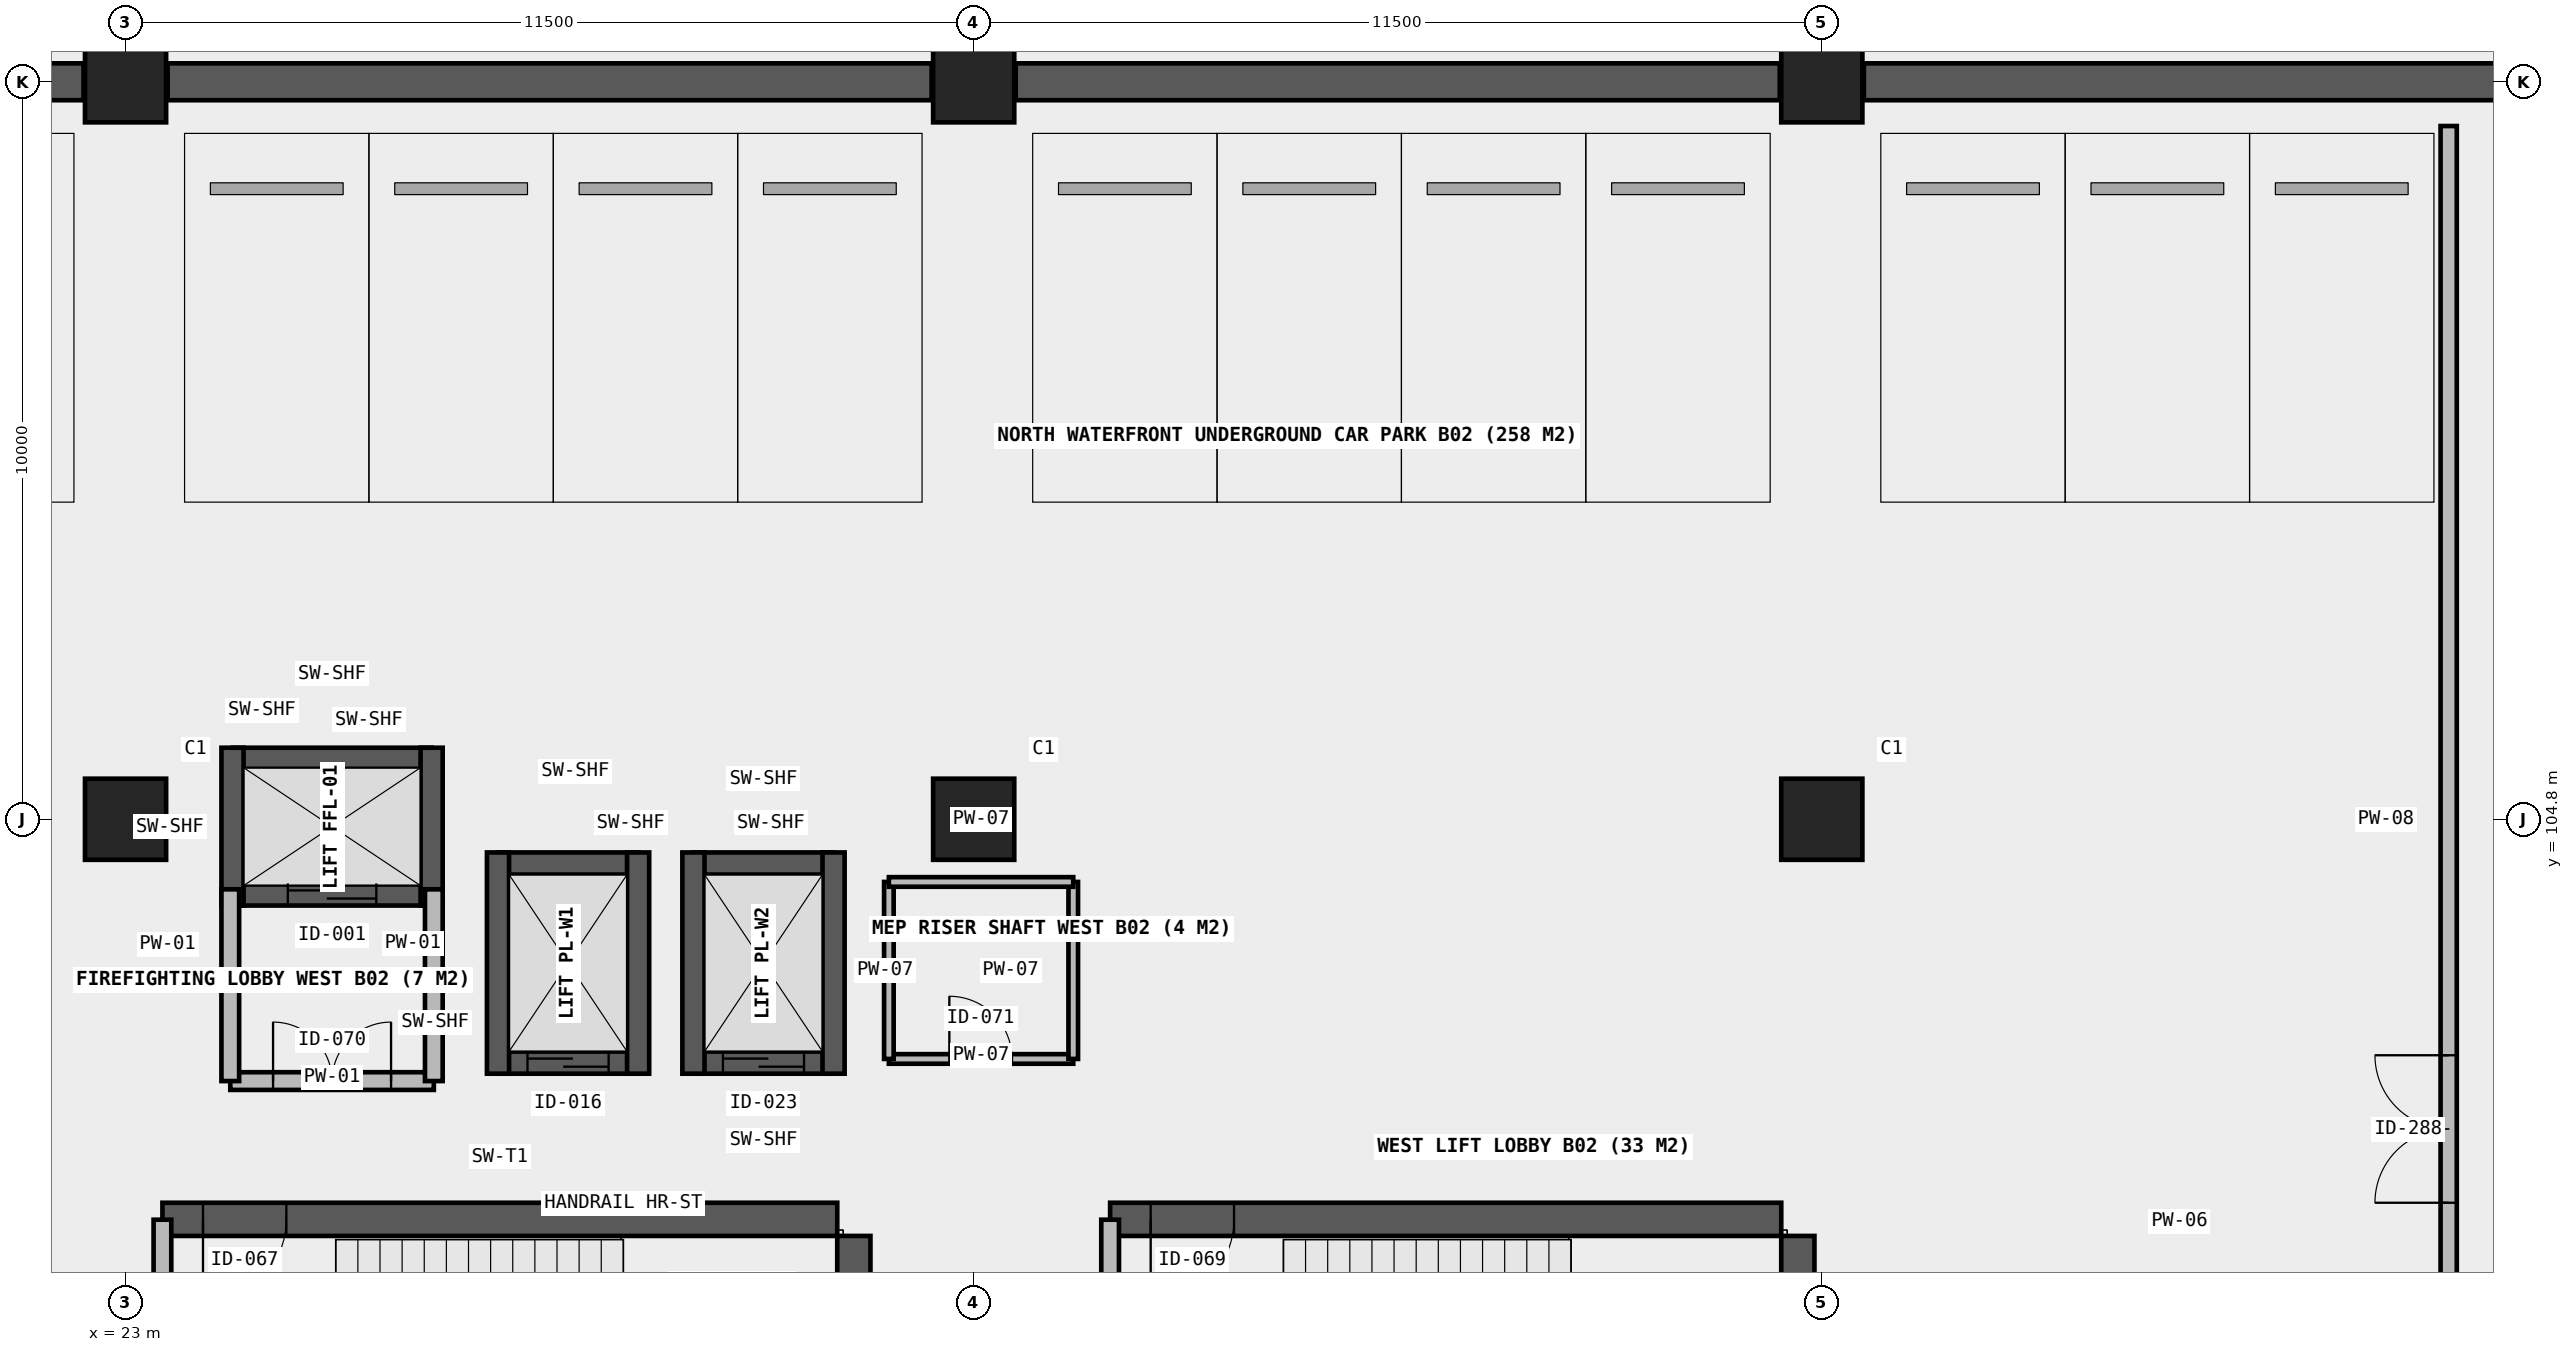
"""IFC4 building model, lengths in metres.
Left out: names, types, materials, properties, quantities, classifications, styles, units other than length and angle.
Written with IfcOpenShell. Run it as: python <this file> out.ifc"""

import sys

from ifc_helpers import new_model, si_unit, direction, frame, frame_2d, origin, origin_2d, place, context, subcontext, project, spatial, rectangle, extrude, element, fill, save


model = new_model("IFC4")
c1 = context("Model", 3, precision=1e-05, world=origin(), true_north=direction((0.0, 1.0)))
c2 = subcontext(c1, "Body", "Model", "MODEL_VIEW")
j1 = project(units=[si_unit("LENGTHUNIT", "METRE"), si_unit("PLANEANGLEUNIT", "RADIAN")], contexts=[c1])
p1 = place(None, origin())
s1 = spatial("IfcSite", under=j1, at=p1, CompositionType="ELEMENT")
p2 = place(p1, origin())
s2 = spatial("IfcBuilding", under=s1, at=p2, CompositionType="ELEMENT")
p3 = place(p2, frame((0.0, 0.0, -8.4)))
s3 = spatial("IfcBuildingStorey", under=s2, at=p3, CompositionType="ELEMENT", Elevation=-8.4)
for number, where, z_axis, x_axis in (
    (1, (23.0, 104.8, 0.0), (0.0, 0.0, 1.0), (1.0, 0.0, 0.0)),
    (2, (23.0, 114.8, 0.0), (0.0, 0.0, 1.0), (1.0, 0.0, 0.0)),
    (3, (34.5, 104.8, 0.0), (0.0, 0.0, 1.0), (1.0, 0.0, 0.0)),
    (4, (34.5, 114.8, 0.0), (0.0, 0.0, 1.0), (1.0, 0.0, 0.0)),
    (5, (46.0, 104.8, 0.0), (0.0, 0.0, 1.0), (1.0, 0.0, 0.0)),
    (6, (46.0, 114.8, 0.0), (0.0, 0.0, 1.0), (1.0, 0.0, 0.0)),
):
    element("IfcColumn", number, at=place(p3, frame(where, z_axis=z_axis, x_axis=x_axis)), inside=s3, PredefinedType="COLUMN", context=c2, shape_type="SweptSolid", body=[
        extrude(rectangle(XDim=1.1, YDim=1.1, at=origin_2d()), origin(), (0.0, 0.0, 1.0), 4.2),
    ])
for number, where, z_axis, x_axis in (
    (7, (12.07, 114.8, 0.0), (0.0, 0.0, 1.0), (1.0, 0.0, 0.0)),
    (8, (23.57, 114.8, 0.0), (0.0, 0.0, 1.0), (1.0, 0.0, 0.0)),
    (9, (35.07, 114.8, 0.0), (0.0, 0.0, 1.0), (1.0, 0.0, 0.0)),
    (10, (46.57, 114.8, 0.0), (0.0, 0.0, 1.0), (1.0, 0.0, 0.0)),
):
    element("IfcWall", number, at=place(p3, frame(where, z_axis=z_axis, x_axis=x_axis)), inside=s3, PredefinedType="SHEAR", context=c2, shape_type="SweptSolid", body=[
        extrude(rectangle(XDim=10.36, YDim=0.5, at=frame_2d((5.18, 0.0))), origin(), (0.0, 0.0, 1.0), 4.2),
    ])
p4 = place(p3, frame((24.45, 103.78, 0.0), z_axis=(0.0, 0.0, 1.0), x_axis=(1.0, 0.0, 0.0)))
e11 = element("IfcWall", 11, at=p4, inside=s3, PredefinedType="SHEAR", context=c2, shape_type="SweptSolid", body=[
    extrude(rectangle(XDim=2.7, YDim=0.3, at=frame_2d((1.35, 0.0))), origin(), (0.0, 0.0, 1.0), 4.2),
])
p5 = place(p4, frame((0.75, 0.0, 0.0)))
e12 = element("IfcOpeningElement", 12, at=p5, cuts=e11, PredefinedType="OPENING", context=c2, shape_type="SweptSolid", body=[
    extrude(rectangle(XDim=1.2, YDim=2.15, at=frame_2d((0.6, 1.075))), frame((0.0, 0.16, 0.0), z_axis=(0.0, -1.0, 0.0), x_axis=(1.0, 0.0, 0.0)), (0.0, 0.0, 1.0), 0.32),
])
p6 = place(p3, frame((24.45, 105.62, 0.0), z_axis=(0.0, 0.0, 1.0), x_axis=(1.0, 0.0, 0.0)))
e13 = element("IfcWall", 13, at=p6, inside=s3, PredefinedType="SHEAR", context=c2, shape_type="SweptSolid", body=[
    extrude(rectangle(XDim=2.7, YDim=0.3, at=frame_2d((1.35, 0.0))), origin(), (0.0, 0.0, 1.0), 4.2),
])
for number, where, z_axis, x_axis in (
    (14, (24.45, 103.63, 0.0), (0.0, 0.0, 1.0), (0.0, 1.0, 0.0)),
    (15, (27.15, 103.63, 0.0), (0.0, 0.0, 1.0), (0.0, 1.0, 0.0)),
):
    element("IfcWall", number, at=place(p3, frame(where, z_axis=z_axis, x_axis=x_axis)), inside=s3, PredefinedType="SHEAR", context=c2, shape_type="SweptSolid", body=[
        extrude(rectangle(XDim=2.14, YDim=0.3, at=frame_2d((1.07, 0.0))), origin(), (0.0, 0.0, 1.0), 4.2),
    ])
p7 = place(p3, frame((28.05, 101.5, 0.0), z_axis=(0.0, 0.0, 1.0), x_axis=(1.0, 0.0, 0.0)))
e16 = element("IfcWall", 16, at=p7, inside=s3, PredefinedType="SHEAR", context=c2, shape_type="SweptSolid", body=[
    extrude(rectangle(XDim=1.9, YDim=0.3, at=frame_2d((0.95, 0.0))), origin(), (0.0, 0.0, 1.0), 4.2),
])
p8 = place(p7, frame((0.4, 0.0, 0.0)))
e17 = element("IfcOpeningElement", 17, at=p8, cuts=e16, PredefinedType="OPENING", context=c2, shape_type="SweptSolid", body=[
    extrude(rectangle(XDim=1.1, YDim=2.15, at=frame_2d((0.55, 1.075))), frame((0.0, 0.16, 0.0), z_axis=(0.0, -1.0, 0.0), x_axis=(1.0, 0.0, 0.0)), (0.0, 0.0, 1.0), 0.32),
])
p9 = place(p3, frame((28.05, 104.2, 0.0), z_axis=(0.0, 0.0, 1.0), x_axis=(1.0, 0.0, 0.0)))
e18 = element("IfcWall", 18, at=p9, inside=s3, PredefinedType="SHEAR", context=c2, shape_type="SweptSolid", body=[
    extrude(rectangle(XDim=1.9, YDim=0.3, at=frame_2d((0.95, 0.0))), origin(), (0.0, 0.0, 1.0), 4.2),
])
for number, where, z_axis, x_axis in (
    (19, (28.05, 101.35, 0.0), (0.0, 0.0, 1.0), (0.0, 1.0, 0.0)),
    (20, (29.95, 101.35, 0.0), (0.0, 0.0, 1.0), (0.0, 1.0, 0.0)),
):
    element("IfcWall", number, at=place(p3, frame(where, z_axis=z_axis, x_axis=x_axis)), inside=s3, PredefinedType="SHEAR", context=c2, shape_type="SweptSolid", body=[
        extrude(rectangle(XDim=3.0, YDim=0.3, at=frame_2d((1.5, 0.0))), origin(), (0.0, 0.0, 1.0), 4.2),
    ])
p10 = place(p3, frame((30.7, 101.5, 0.0), z_axis=(0.0, 0.0, 1.0), x_axis=(1.0, 0.0, 0.0)))
e21 = element("IfcWall", 21, at=p10, inside=s3, PredefinedType="SHEAR", context=c2, shape_type="SweptSolid", body=[
    extrude(rectangle(XDim=1.9, YDim=0.3, at=frame_2d((0.95, 0.0))), origin(), (0.0, 0.0, 1.0), 4.2),
])
p11 = place(p10, frame((0.4, 0.0, 0.0)))
e22 = element("IfcOpeningElement", 22, at=p11, cuts=e21, PredefinedType="OPENING", context=c2, shape_type="SweptSolid", body=[
    extrude(rectangle(XDim=1.1, YDim=2.15, at=frame_2d((0.55, 1.075))), frame((0.0, 0.16, 0.0), z_axis=(0.0, -1.0, 0.0), x_axis=(1.0, 0.0, 0.0)), (0.0, 0.0, 1.0), 0.32),
])
p12 = place(p3, frame((30.7, 104.2, 0.0), z_axis=(0.0, 0.0, 1.0), x_axis=(1.0, 0.0, 0.0)))
e23 = element("IfcWall", 23, at=p12, inside=s3, PredefinedType="SHEAR", context=c2, shape_type="SweptSolid", body=[
    extrude(rectangle(XDim=1.9, YDim=0.3, at=frame_2d((0.95, 0.0))), origin(), (0.0, 0.0, 1.0), 4.2),
])
for number, where, z_axis, x_axis in (
    (24, (30.7, 101.35, 0.0), (0.0, 0.0, 1.0), (0.0, 1.0, 0.0)),
    (25, (32.6, 101.35, 0.0), (0.0, 0.0, 1.0), (0.0, 1.0, 0.0)),
):
    element("IfcWall", number, at=place(p3, frame(where, z_axis=z_axis, x_axis=x_axis)), inside=s3, PredefinedType="SHEAR", context=c2, shape_type="SweptSolid", body=[
        extrude(rectangle(XDim=3.0, YDim=0.3, at=frame_2d((1.5, 0.0))), origin(), (0.0, 0.0, 1.0), 4.2),
    ])
p13 = place(p3, frame((23.5, 99.375, 0.0), z_axis=(0.0, 0.0, 1.0), x_axis=(1.0, 0.0, 0.0)))
e26 = element("IfcWall", 26, at=p13, inside=s3, PredefinedType="SHEAR", context=c2, shape_type="SweptSolid", body=[
    extrude(rectangle(XDim=9.15, YDim=0.45, at=frame_2d((4.575, 0.0))), origin(), (0.0, 0.0, 1.0), 4.2),
])
p14 = place(p13, frame((0.55, 0.0, 0.0)))
e27 = element("IfcOpeningElement", 27, at=p14, cuts=e26, PredefinedType="OPENING", context=c2, shape_type="SweptSolid", body=[
    extrude(rectangle(XDim=1.13, YDim=2.15, at=frame_2d((0.565, 1.075))), frame((0.0, 0.235, 0.0), z_axis=(0.0, -1.0, 0.0), x_axis=(1.0, 0.0, 0.0)), (0.0, 0.0, 1.0), 0.47),
])
p15 = place(p3, frame((32.875, 95.55, 0.0), z_axis=(0.0, 0.0, 1.0), x_axis=(0.0, 1.0, 0.0)))
e28 = element("IfcWall", 28, at=p15, inside=s3, PredefinedType="SHEAR", context=c2, shape_type="SweptSolid", body=[
    extrude(rectangle(XDim=3.6, YDim=0.45, at=frame_2d((1.8, 0.0))), origin(), (0.0, 0.0, 1.0), 4.2),
])
p16 = place(p3, frame((36.35, 99.375, 0.0), z_axis=(0.0, 0.0, 1.0), x_axis=(1.0, 0.0, 0.0)))
e29 = element("IfcWall", 29, at=p16, inside=s3, PredefinedType="SHEAR", context=c2, shape_type="SweptSolid", body=[
    extrude(rectangle(XDim=9.1, YDim=0.45, at=frame_2d((4.55, 0.0))), origin(), (0.0, 0.0, 1.0), 4.2),
])
p17 = place(p16, frame((0.55, 0.0, 0.0)))
e30 = element("IfcOpeningElement", 30, at=p17, cuts=e29, PredefinedType="OPENING", context=c2, shape_type="SweptSolid", body=[
    extrude(rectangle(XDim=1.13, YDim=2.15, at=frame_2d((0.565, 1.075))), frame((0.0, 0.235, 0.0), z_axis=(0.0, -1.0, 0.0), x_axis=(1.0, 0.0, 0.0)), (0.0, 0.0, 1.0), 0.47),
])
p18 = place(p3, frame((45.675, 95.37, 0.0), z_axis=(0.0, 0.0, 1.0), x_axis=(0.0, 1.0, 0.0)))
e31 = element("IfcWall", 31, at=p18, inside=s3, PredefinedType="SHEAR", context=c2, shape_type="SweptSolid", body=[
    extrude(rectangle(XDim=3.78, YDim=0.45, at=frame_2d((1.89, 0.0))), origin(), (0.0, 0.0, 1.0), 4.2),
])
p19 = place(p3, frame((23.5, 95.33, 0.0), z_axis=(0.0, 0.0, 1.0), x_axis=(0.0, 1.0, 0.0)))
e32 = element("IfcWall", 32, at=p19, inside=s3, PredefinedType="SOLIDWALL", context=c2, shape_type="SweptSolid", body=[
    extrude(rectangle(XDim=4.04, YDim=0.24, at=frame_2d((2.02, 0.0))), origin(), (0.0, 0.0, 1.0), 3.9),
])
p20 = place(p19, frame((1.45, 0.0, 0.0)))
e33 = element("IfcOpeningElement", 33, at=p20, cuts=e32, PredefinedType="OPENING", context=c2, shape_type="SweptSolid", body=[
    extrude(rectangle(XDim=1.13, YDim=2.15, at=frame_2d((0.565, 1.075))), frame((0.0, 0.13, 0.0), z_axis=(0.0, -1.0, 0.0), x_axis=(1.0, 0.0, 0.0)), (0.0, 0.0, 1.0), 0.26),
])
p21 = place(p3, frame((36.35, 95.33, 0.0), z_axis=(0.0, 0.0, 1.0), x_axis=(0.0, 1.0, 0.0)))
e34 = element("IfcWall", 34, at=p21, inside=s3, PredefinedType="SOLIDWALL", context=c2, shape_type="SweptSolid", body=[
    extrude(rectangle(XDim=4.04, YDim=0.24, at=frame_2d((2.02, 0.0))), origin(), (0.0, 0.0, 1.0), 3.9),
])
p22 = place(p21, frame((1.45, 0.0, 0.0)))
e35 = element("IfcOpeningElement", 35, at=p22, cuts=e34, PredefinedType="OPENING", context=c2, shape_type="SweptSolid", body=[
    extrude(rectangle(XDim=1.13, YDim=2.15, at=frame_2d((0.565, 1.075))), frame((0.0, 0.13, 0.0), z_axis=(0.0, -1.0, 0.0), x_axis=(1.0, 0.0, 0.0)), (0.0, 0.0, 1.0), 0.26),
])
p23 = place(p3, frame((24.42, 101.25, 0.0), z_axis=(0.0, 0.0, 1.0), x_axis=(1.0, 0.0, 0.0)))
e36 = element("IfcWall", 36, at=p23, inside=s3, PredefinedType="SOLIDWALL", context=c2, shape_type="SweptSolid", body=[
    extrude(rectangle(XDim=2.76, YDim=0.24, at=frame_2d((1.38, 0.0))), origin(), (0.0, 0.0, 1.0), 3.9),
])
p24 = place(p23, frame((0.58, 0.0, 0.0)))
e37 = element("IfcOpeningElement", 37, at=p24, cuts=e36, PredefinedType="OPENING", context=c2, shape_type="SweptSolid", body=[
    extrude(rectangle(XDim=1.6, YDim=2.15, at=frame_2d((0.8, 1.075))), frame((0.0, 0.13, 0.0), z_axis=(0.0, -1.0, 0.0), x_axis=(1.0, 0.0, 0.0)), (0.0, 0.0, 1.0), 0.26),
])
for number, where, z_axis, x_axis in (
    (38, (24.42, 101.25, 0.0), (0.0, 0.0, 1.0), (0.0, 1.0, 0.0)),
    (39, (27.18, 101.25, 0.0), (0.0, 0.0, 1.0), (0.0, 1.0, 0.0)),
):
    element("IfcWall", number, at=place(p3, frame(where, z_axis=z_axis, x_axis=x_axis)), inside=s3, PredefinedType="SOLIDWALL", context=c2, shape_type="SweptSolid", body=[
        extrude(rectangle(XDim=2.6, YDim=0.24, at=frame_2d((1.3, 0.0))), origin(), (0.0, 0.0, 1.0), 3.9),
    ])
p25 = place(p3, frame((33.35, 101.55, 0.0), z_axis=(0.0, 0.0, 1.0), x_axis=(1.0, 0.0, 0.0)))
e40 = element("IfcWall", 40, at=p25, inside=s3, PredefinedType="PLUMBINGWALL", context=c2, shape_type="SweptSolid", body=[
    extrude(rectangle(XDim=2.5, YDim=0.13, at=frame_2d((1.25, 0.0))), origin(), (0.0, 0.0, 1.0), 3.9),
])
p26 = place(p25, frame((0.82, 0.0, 0.0)))
e41 = element("IfcOpeningElement", 41, at=p26, cuts=e40, PredefinedType="OPENING", context=c2, shape_type="SweptSolid", body=[
    extrude(rectangle(XDim=0.85, YDim=2.0, at=frame_2d((0.425, 1.0))), frame((0.0, 0.075, 0.0), z_axis=(0.0, -1.0, 0.0), x_axis=(1.0, 0.0, 0.0)), (0.0, 0.0, 1.0), 0.15),
])
for number, where, z_axis, x_axis in (
    (42, (33.35, 101.55, 0.0), (0.0, 0.0, 1.0), (0.0, 1.0, 0.0)),
    (43, (35.85, 101.55, 0.0), (0.0, 0.0, 1.0), (0.0, 1.0, 0.0)),
):
    element("IfcWall", number, at=place(p3, frame(where, z_axis=z_axis, x_axis=x_axis)), inside=s3, PredefinedType="PLUMBINGWALL", context=c2, shape_type="SweptSolid", body=[
        extrude(rectangle(XDim=2.4, YDim=0.13, at=frame_2d((1.2, 0.0))), origin(), (0.0, 0.0, 1.0), 3.9),
    ])
p27 = place(p3, frame((33.35, 103.95, 0.0), z_axis=(0.0, 0.0, 1.0), x_axis=(1.0, 0.0, 0.0)))
e44 = element("IfcWall", 44, at=p27, inside=s3, PredefinedType="PLUMBINGWALL", context=c2, shape_type="SweptSolid", body=[
    extrude(rectangle(XDim=2.5, YDim=0.13, at=frame_2d((1.25, 0.0))), origin(), (0.0, 0.0, 1.0), 3.9),
])
p28 = place(p3, frame((54.5, 95.4, 0.0), z_axis=(0.0, 0.0, 1.0), x_axis=(0.0, 1.0, 0.0)))
e45 = element("IfcWall", 45, at=p28, inside=s3, PredefinedType="SOLIDWALL", context=c2, shape_type="SweptSolid", body=[
    extrude(rectangle(XDim=18.8, YDim=0.22, at=frame_2d((9.4, 0.0))), origin(), (0.0, 0.0, 1.0), 3.9),
])
p29 = place(p28, frame((4.2, 0.0, 0.0)))
e46 = element("IfcOpeningElement", 46, at=p29, cuts=e45, PredefinedType="OPENING", context=c2, shape_type="SweptSolid", body=[
    extrude(rectangle(XDim=2.0, YDim=2.3, at=frame_2d((1.0, 1.15))), frame((0.0, 0.12, 0.0), z_axis=(0.0, -1.0, 0.0), x_axis=(1.0, 0.0, 0.0)), (0.0, 0.0, 1.0), 0.24),
])
p30 = place(p5, origin())
e47 = element("IfcDoor", 47, at=p30, inside=s3, OperationType="SLIDING_TO_RIGHT", PredefinedType="DOOR", context=c2, shape_type="SweptSolid", body=[
    extrude(rectangle(XDim=1.2, YDim=2.15, at=frame_2d((0.6, 1.075))), frame((0.0, 0.025, 0.0), z_axis=(0.0, -1.0, 0.0), x_axis=(1.0, 0.0, 0.0)), (0.0, 0.0, 1.0), 0.05),
])
fill(e12, e47)
p31 = place(p8, origin())
e48 = element("IfcDoor", 48, at=p31, inside=s3, OperationType="SLIDING_TO_LEFT", PredefinedType="DOOR", context=c2, shape_type="SweptSolid", body=[
    extrude(rectangle(XDim=1.1, YDim=2.15, at=frame_2d((0.55, 1.075))), frame((0.0, 0.025, 0.0), z_axis=(0.0, -1.0, 0.0), x_axis=(1.0, 0.0, 0.0)), (0.0, 0.0, 1.0), 0.05),
])
fill(e17, e48)
p32 = place(p11, origin())
e49 = element("IfcDoor", 49, at=p32, inside=s3, OperationType="SLIDING_TO_LEFT", PredefinedType="DOOR", context=c2, shape_type="SweptSolid", body=[
    extrude(rectangle(XDim=1.1, YDim=2.15, at=frame_2d((0.55, 1.075))), frame((0.0, 0.025, 0.0), z_axis=(0.0, -1.0, 0.0), x_axis=(1.0, 0.0, 0.0)), (0.0, 0.0, 1.0), 0.05),
])
fill(e22, e49)
p33 = place(p14, frame((0.565, 0.0, 0.0), z_axis=(0.0, 0.0, 1.0), x_axis=(-1.0, 0.0, 0.0)))
e50 = element("IfcDoor", 50, at=p33, inside=s3, OperationType="SINGLE_SWING_LEFT", PredefinedType="DOOR", context=c2, shape_type="SweptSolid", body=[
    extrude(rectangle(XDim=1.13, YDim=2.15, at=frame_2d((0.0, 1.075))), frame((0.0, 0.025, 0.0), z_axis=(0.0, -1.0, 0.0), x_axis=(1.0, 0.0, 0.0)), (0.0, 0.0, 1.0), 0.05),
])
fill(e27, e50)
p34 = place(p17, frame((0.565, 0.0, 0.0), z_axis=(0.0, 0.0, 1.0), x_axis=(-1.0, 0.0, 0.0)))
e51 = element("IfcDoor", 51, at=p34, inside=s3, OperationType="SINGLE_SWING_LEFT", PredefinedType="DOOR", context=c2, shape_type="SweptSolid", body=[
    extrude(rectangle(XDim=1.13, YDim=2.15, at=frame_2d((0.0, 1.075))), frame((0.0, 0.025, 0.0), z_axis=(0.0, -1.0, 0.0), x_axis=(1.0, 0.0, 0.0)), (0.0, 0.0, 1.0), 0.05),
])
fill(e30, e51)
p35 = place(p24, origin())
e52 = element("IfcDoor", 52, at=p35, inside=s3, OperationType="DOUBLE_DOOR_SINGLE_SWING", PredefinedType="DOOR", context=c2, shape_type="SweptSolid", body=[
    extrude(rectangle(XDim=1.6, YDim=2.15, at=frame_2d((0.8, 1.075))), frame((0.0, 0.025, 0.0), z_axis=(0.0, -1.0, 0.0), x_axis=(1.0, 0.0, 0.0)), (0.0, 0.0, 1.0), 0.05),
])
fill(e37, e52)
p36 = place(p26, origin())
e53 = element("IfcDoor", 53, at=p36, inside=s3, OperationType="SINGLE_SWING_LEFT", PredefinedType="TRAPDOOR", context=c2, shape_type="SweptSolid", body=[
    extrude(rectangle(XDim=0.85, YDim=2.0, at=frame_2d((0.425, 1.0))), frame((0.0, 0.025, 0.0), z_axis=(0.0, -1.0, 0.0), x_axis=(1.0, 0.0, 0.0)), (0.0, 0.0, 1.0), 0.05),
])
fill(e41, e53)
p37 = place(p29, origin())
e54 = element("IfcDoor", 54, at=p37, inside=s3, OperationType="DOUBLE_DOOR_SINGLE_SWING", PredefinedType="DOOR", context=c2, shape_type="SweptSolid", body=[
    extrude(rectangle(XDim=2.0, YDim=2.3, at=frame_2d((1.0, 1.15))), frame((0.0, 0.025, 0.0), z_axis=(0.0, -1.0, 0.0), x_axis=(1.0, 0.0, 0.0)), (0.0, 0.0, 1.0), 0.05),
])
fill(e46, e54)
save(model, sys.argv[1])
